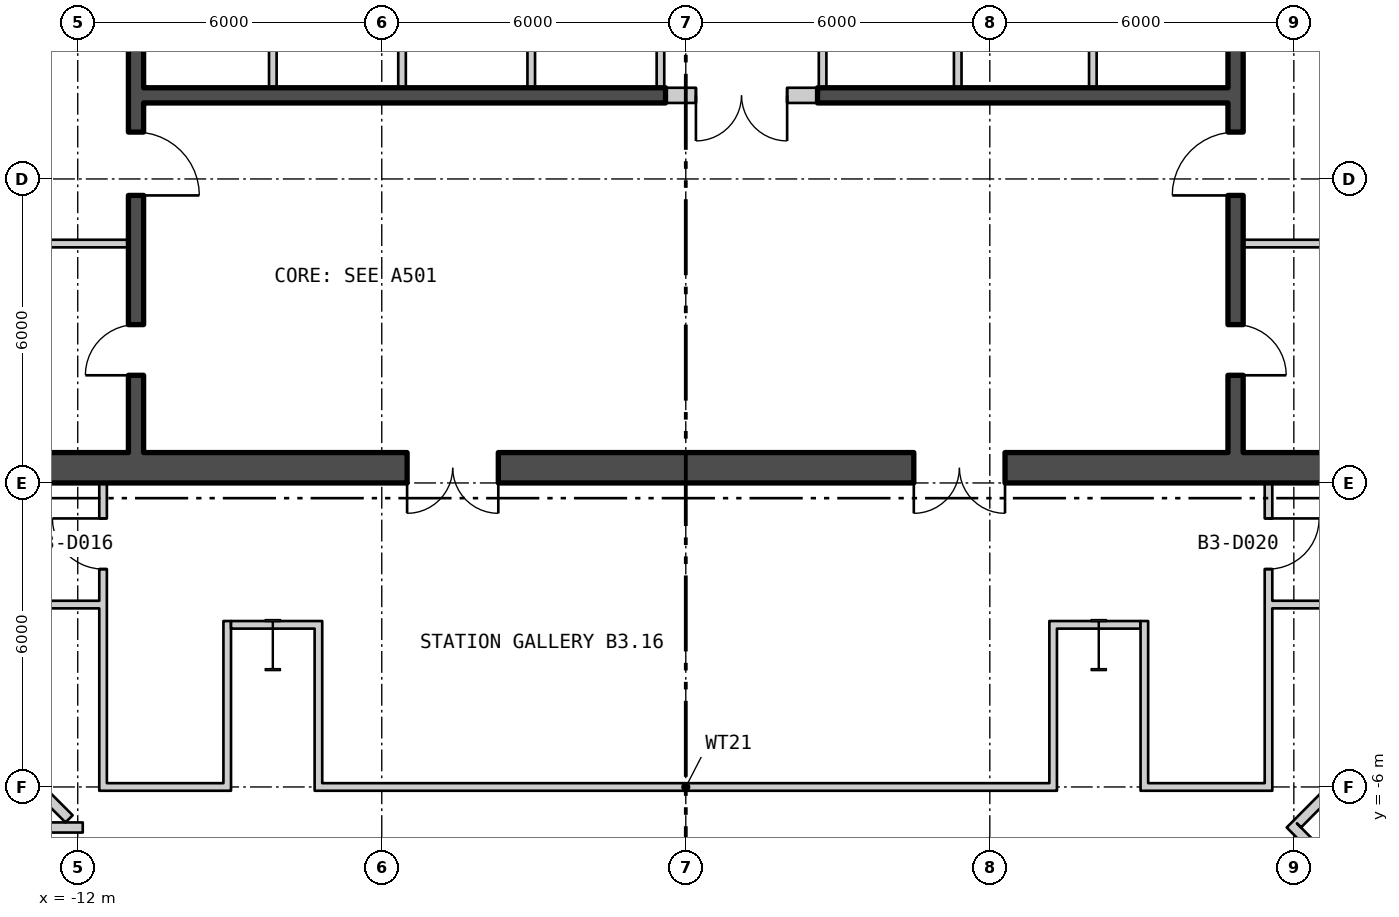
"""IFC4 building model, lengths in metres.
Left out: names, types, materials, properties, quantities, classifications, styles, units other than length and angle.
Written with IfcOpenShell. Run it as: python <this file> out.ifc"""

import sys

from ifc_helpers import new_model, si_unit, direction, frame, frame_2d, origin, origin_2d, place, context, subcontext, project, spatial, rectangle, i_section, extrude, element, fill, save


model = new_model("IFC4")
c1 = context("Model", 3, precision=1e-05, world=origin(), true_north=direction((0.0, 1.0)))
c2 = subcontext(c1, "Body", "Model", "MODEL_VIEW")
j1 = project(units=[si_unit("LENGTHUNIT", "METRE"), si_unit("PLANEANGLEUNIT", "RADIAN")], contexts=[c1])
p1 = place(None, origin())
s1 = spatial("IfcSite", under=j1, at=p1, CompositionType="ELEMENT")
p2 = place(p1, origin())
s2 = spatial("IfcBuilding", under=s1, at=p2, CompositionType="ELEMENT")
p3 = place(p2, frame((0.0, 0.0, -16.8)))
s3 = spatial("IfcBuildingStorey", under=s2, at=p3, CompositionType="ELEMENT", Elevation=-16.8)
for number, where, z_axis, x_axis in (
    (1, (8.15, -3.2, 0.0), (0.0, 0.0, 1.0), (1.0, 0.0, 0.0)),
    (2, (-8.15, -3.2, 0.0), (0.0, 0.0, 1.0), (1.0, 0.0, 0.0)),
):
    element("IfcColumn", number, at=place(p3, frame(where, z_axis=z_axis, x_axis=x_axis)), inside=s3, PredefinedType="COLUMN", context=c2, shape_type="SweptSolid", body=[
        extrude(i_section(OverallWidth=0.302, OverallDepth=1.008, WebThickness=0.021, FlangeThickness=0.04, at=origin_2d()), origin(), (0.0, 0.0, 1.0), 5.4),
    ])
p4 = place(p3, frame((-17.5, 0.3, 0.0), z_axis=(0.0, 0.0, 1.0), x_axis=(1.0, 0.0, 0.0)))
e3 = element("IfcWall", 3, at=p4, inside=s3, PredefinedType="SHEAR", context=c2, shape_type="SweptSolid", body=[
    extrude(rectangle(XDim=35.0, YDim=0.6, at=frame_2d((17.5, 0.0))), origin(), (0.0, 0.0, 1.0), 4.95),
])
p5 = place(p4, frame((12.0, 0.0, 0.0)))
e4 = element("IfcOpeningElement", 4, at=p5, cuts=e3, PredefinedType="OPENING", context=c2, shape_type="SweptSolid", body=[
    extrude(rectangle(XDim=1.8, YDim=2.4, at=frame_2d((0.9, 1.2))), frame((0.0, 0.31, 0.0), z_axis=(0.0, -1.0, 0.0), x_axis=(1.0, 0.0, 0.0)), (0.0, 0.0, 1.0), 0.62),
])
p6 = place(p4, frame((22.0, 0.0, 0.0)))
e5 = element("IfcOpeningElement", 5, at=p6, cuts=e3, PredefinedType="OPENING", context=c2, shape_type="SweptSolid", body=[
    extrude(rectangle(XDim=1.8, YDim=2.4, at=frame_2d((0.9, 1.2))), frame((0.0, 0.31, 0.0), z_axis=(0.0, -1.0, 0.0), x_axis=(1.0, 0.0, 0.0)), (0.0, 0.0, 1.0), 0.62),
])
p7 = place(p3, frame((-10.85, 0.6, 0.0), z_axis=(0.0, 0.0, 1.0), x_axis=(0.0, 1.0, 0.0)))
e6 = element("IfcWall", 6, at=p7, inside=s3, PredefinedType="SHEAR", context=c2, shape_type="SweptSolid", body=[
    extrude(rectangle(XDim=16.8, YDim=0.3, at=frame_2d((8.4, 0.0))), origin(), (0.0, 0.0, 1.0), 4.95),
])
p8 = place(p7, frame((5.075, 0.0, 0.0)))
e7 = element("IfcOpeningElement", 7, at=p8, cuts=e6, PredefinedType="OPENING", context=c2, shape_type="SweptSolid", body=[
    extrude(rectangle(XDim=1.25, YDim=2.1, at=frame_2d((0.625, 1.05))), frame((0.0, 0.16, 0.0), z_axis=(0.0, -1.0, 0.0), x_axis=(1.0, 0.0, 0.0)), (0.0, 0.0, 1.0), 0.32),
])
p9 = place(p7, frame((1.525, 0.0, 0.0)))
e8 = element("IfcOpeningElement", 8, at=p9, cuts=e6, PredefinedType="OPENING", context=c2, shape_type="SweptSolid", body=[
    extrude(rectangle(XDim=1.0, YDim=2.1, at=frame_2d((0.5, 1.05))), frame((0.0, 0.16, 0.0), z_axis=(0.0, -1.0, 0.0), x_axis=(1.0, 0.0, 0.0)), (0.0, 0.0, 1.0), 0.32),
])
p10 = place(p3, frame((10.85, 0.6, 0.0), z_axis=(0.0, 0.0, 1.0), x_axis=(0.0, 1.0, 0.0)))
e9 = element("IfcWall", 9, at=p10, inside=s3, PredefinedType="SHEAR", context=c2, shape_type="SweptSolid", body=[
    extrude(rectangle(XDim=16.8, YDim=0.3, at=frame_2d((8.4, 0.0))), origin(), (0.0, 0.0, 1.0), 4.95),
])
p11 = place(p10, frame((5.075, 0.0, 0.0)))
e10 = element("IfcOpeningElement", 10, at=p11, cuts=e9, PredefinedType="OPENING", context=c2, shape_type="SweptSolid", body=[
    extrude(rectangle(XDim=1.25, YDim=2.1, at=frame_2d((0.625, 1.05))), frame((0.0, 0.16, 0.0), z_axis=(0.0, -1.0, 0.0), x_axis=(1.0, 0.0, 0.0)), (0.0, 0.0, 1.0), 0.32),
])
p12 = place(p10, frame((1.525, 0.0, 0.0)))
e11 = element("IfcOpeningElement", 11, at=p12, cuts=e9, PredefinedType="OPENING", context=c2, shape_type="SweptSolid", body=[
    extrude(rectangle(XDim=1.0, YDim=2.1, at=frame_2d((0.5, 1.05))), frame((0.0, 0.16, 0.0), z_axis=(0.0, -1.0, 0.0), x_axis=(1.0, 0.0, 0.0)), (0.0, 0.0, 1.0), 0.32),
])
p13 = place(p3, frame((-10.7, 7.65, 0.0), z_axis=(0.0, 0.0, 1.0), x_axis=(1.0, 0.0, 0.0)))
e12 = element("IfcWall", 12, at=p13, inside=s3, PredefinedType="SHEAR", context=c2, shape_type="SweptSolid", body=[
    extrude(rectangle(XDim=10.3, YDim=0.3, at=frame_2d((5.15, 0.0))), origin(), (0.0, 0.0, 1.0), 4.95),
])
p14 = place(p3, frame((2.6, 7.65, 0.0), z_axis=(0.0, 0.0, 1.0), x_axis=(1.0, 0.0, 0.0)))
e13 = element("IfcWall", 13, at=p14, inside=s3, PredefinedType="SHEAR", context=c2, shape_type="SweptSolid", body=[
    extrude(rectangle(XDim=8.1, YDim=0.3, at=frame_2d((4.05, 0.0))), origin(), (0.0, 0.0, 1.0), 4.95),
])
for number, where, z_axis, x_axis in (
    (14, (-8.15, 7.8, 0.0), (0.0, 0.0, 1.0), (0.0, 1.0, 0.0)),
    (15, (-5.6, 7.8, 0.0), (0.0, 0.0, 1.0), (0.0, 1.0, 0.0)),
    (16, (-3.05, 7.8, 0.0), (0.0, 0.0, 1.0), (0.0, 1.0, 0.0)),
    (17, (-0.5, 7.8, 0.0), (0.0, 0.0, 1.0), (0.0, 1.0, 0.0)),
    (18, (2.7, 7.8, 0.0), (0.0, 0.0, 1.0), (0.0, 1.0, 0.0)),
    (19, (5.367, 7.8, 0.0), (0.0, 0.0, 1.0), (0.0, 1.0, 0.0)),
    (20, (8.033, 7.8, 0.0), (0.0, 0.0, 1.0), (0.0, 1.0, 0.0)),
):
    element("IfcWall", number, at=place(p3, frame(where, z_axis=z_axis, x_axis=x_axis)), inside=s3, PredefinedType="PARTITIONING", context=c2, shape_type="SweptSolid", body=[
        extrude(rectangle(XDim=2.7, YDim=0.15, at=frame_2d((1.35, 0.0))), origin(), (0.0, 0.0, 1.0), 4.95),
    ])
for number, where, z_axis, x_axis in (
    (21, (-14.2, 4.725, 0.0), (0.0, 0.0, 1.0), (1.0, 0.0, 0.0)),
    (22, (11.0, 4.725, 0.0), (0.0, 0.0, 1.0), (1.0, 0.0, 0.0)),
):
    element("IfcWall", number, at=place(p3, frame(where, z_axis=z_axis, x_axis=x_axis)), inside=s3, PredefinedType="PARTITIONING", context=c2, shape_type="SweptSolid", body=[
        extrude(rectangle(XDim=3.2, YDim=0.15, at=frame_2d((1.6, 0.0))), origin(), (0.0, 0.0, 1.0), 4.95),
    ])
p15 = place(p3, frame((-0.4, 7.65, 0.0), z_axis=(0.0, 0.0, 1.0), x_axis=(1.0, 0.0, 0.0)))
e23 = element("IfcWall", 23, at=p15, inside=s3, PredefinedType="PARTITIONING", context=c2, shape_type="SweptSolid", body=[
    extrude(rectangle(XDim=3.0, YDim=0.3, at=frame_2d((1.5, 0.0))), origin(), (0.0, 0.0, 1.0), 4.95),
])
p16 = place(p15, frame((0.6, 0.0, 0.0)))
e24 = element("IfcOpeningElement", 24, at=p16, cuts=e23, PredefinedType="OPENING", context=c2, shape_type="SweptSolid", body=[
    extrude(rectangle(XDim=1.8, YDim=2.4, at=frame_2d((0.9, 1.2))), frame((0.0, 0.16, 0.0), z_axis=(0.0, -1.0, 0.0), x_axis=(1.0, 0.0, 0.0)), (0.0, 0.0, 1.0), 0.32),
])
p17 = place(p3, frame((-17.2, -6.799, 0.0), z_axis=(0.0, 0.0, 1.0), x_axis=(0.999999982193, -0.000188714848, 0.0)))
e25 = element("IfcWall", 25, at=p17, inside=s3, PredefinedType="PARTITIONING", context=c2, shape_type="SweptSolid", body=[
    extrude(rectangle(XDim=5.299, YDim=0.2, at=frame_2d((2.65, 0.0))), origin(), (0.0, 0.0, 1.0), 4.95),
])
p18 = place(p3, frame((-12.721, -2.4, 0.0), z_axis=(0.0, 0.0, 1.0), x_axis=(1.0, 0.0, 0.0)))
e26 = element("IfcWall", 26, at=p18, inside=s3, PredefinedType="PARTITIONING", context=c2, shape_type="SweptSolid", body=[
    extrude(rectangle(XDim=1.146, YDim=0.15, at=frame_2d((0.573, 0.0))), origin(), (0.0, 0.0, 1.0), 4.95),
])
p19 = place(p3, frame((-12.633, -6.167, 0.0), z_axis=(0.0, 0.0, 1.0), x_axis=(0.707106781187, -0.707106781187, 0.0)))
e27 = element("IfcWall", 27, at=p19, inside=s3, PredefinedType="PARTITIONING", context=c2, shape_type="SweptSolid", body=[
    extrude(rectangle(XDim=0.653, YDim=0.2, at=frame_2d((0.327, 0.0))), origin(), (0.0, 0.0, 1.0), 4.95),
])
p20 = place(p3, frame((-11.5, -6.075, 0.0), z_axis=(0.0, 0.0, 1.0), x_axis=(0.0, 1.0, 0.0)))
e28 = element("IfcWall", 28, at=p20, inside=s3, PredefinedType="PARTITIONING", context=c2, shape_type="SweptSolid", body=[
    extrude(rectangle(XDim=6.075, YDim=0.15, at=frame_2d((3.038, 0.0))), origin(), (0.0, 0.0, 1.0), 4.95),
])
p21 = place(p20, frame((4.375, 0.0, 0.0)))
e29 = element("IfcOpeningElement", 29, at=p21, cuts=e28, PredefinedType="OPENING", context=c2, shape_type="SweptSolid", body=[
    extrude(rectangle(XDim=1.0, YDim=2.1, at=frame_2d((0.5, 1.05))), frame((0.0, 0.085, 0.0), z_axis=(0.0, -1.0, 0.0), x_axis=(1.0, 0.0, 0.0)), (0.0, 0.0, 1.0), 0.17),
])
p22 = place(p3, frame((-11.425, -6.0, 0.0), z_axis=(0.0, 0.0, 1.0), x_axis=(1.0, 0.0, 0.0)))
e30 = element("IfcWall", 30, at=p22, inside=s3, PredefinedType="PARTITIONING", context=c2, shape_type="SweptSolid", body=[
    extrude(rectangle(XDim=2.3, YDim=0.15, at=frame_2d((1.15, 0.0))), origin(), (0.0, 0.0, 1.0), 4.95),
])
p23 = place(p3, frame((-9.05, -6.075, 0.0), z_axis=(0.0, 0.0, 1.0), x_axis=(0.0, 1.0, 0.0)))
e31 = element("IfcWall", 31, at=p23, inside=s3, PredefinedType="PARTITIONING", context=c2, shape_type="SweptSolid", body=[
    extrude(rectangle(XDim=3.35, YDim=0.15, at=frame_2d((1.675, 0.0))), origin(), (0.0, 0.0, 1.0), 4.95),
])
p24 = place(p3, frame((-8.975, -2.8, 0.0), z_axis=(0.0, 0.0, 1.0), x_axis=(1.0, 0.0, 0.0)))
e32 = element("IfcWall", 32, at=p24, inside=s3, PredefinedType="PARTITIONING", context=c2, shape_type="SweptSolid", body=[
    extrude(rectangle(XDim=1.65, YDim=0.15, at=frame_2d((0.825, 0.0))), origin(), (0.0, 0.0, 1.0), 4.95),
])
p25 = place(p3, frame((-7.325, -6.0, 0.0), z_axis=(0.0, 0.0, 1.0), x_axis=(1.0, 0.0, 0.0)))
e33 = element("IfcWall", 33, at=p25, inside=s3, PredefinedType="PARTITIONING", context=c2, shape_type="SweptSolid", body=[
    extrude(rectangle(XDim=14.65, YDim=0.15, at=frame_2d((7.325, 0.0))), origin(), (0.0, 0.0, 1.0), 4.95),
])
for number, where, z_axis, x_axis in (
    (34, (-7.25, -5.925, 0.0), (0.0, 0.0, 1.0), (0.0, 1.0, 0.0)),
    (35, (7.25, -5.925, 0.0), (0.0, 0.0, 1.0), (0.0, 1.0, 0.0)),
):
    element("IfcWall", number, at=place(p3, frame(where, z_axis=z_axis, x_axis=x_axis)), inside=s3, PredefinedType="PARTITIONING", context=c2, shape_type="SweptSolid", body=[
        extrude(rectangle(XDim=3.2, YDim=0.15, at=frame_2d((1.6, 0.0))), origin(), (0.0, 0.0, 1.0), 4.95),
    ])
p26 = place(p3, frame((7.325, -2.8, 0.0), z_axis=(0.0, 0.0, 1.0), x_axis=(1.0, 0.0, 0.0)))
e36 = element("IfcWall", 36, at=p26, inside=s3, PredefinedType="PARTITIONING", context=c2, shape_type="SweptSolid", body=[
    extrude(rectangle(XDim=1.65, YDim=0.15, at=frame_2d((0.825, 0.0))), origin(), (0.0, 0.0, 1.0), 4.95),
])
p27 = place(p3, frame((9.05, -6.075, 0.0), z_axis=(0.0, 0.0, 1.0), x_axis=(0.0, 1.0, 0.0)))
e37 = element("IfcWall", 37, at=p27, inside=s3, PredefinedType="PARTITIONING", context=c2, shape_type="SweptSolid", body=[
    extrude(rectangle(XDim=3.35, YDim=0.15, at=frame_2d((1.675, 0.0))), origin(), (0.0, 0.0, 1.0), 4.95),
])
p28 = place(p3, frame((9.125, -6.0, 0.0), z_axis=(0.0, 0.0, 1.0), x_axis=(1.0, 0.0, 0.0)))
e38 = element("IfcWall", 38, at=p28, inside=s3, PredefinedType="PARTITIONING", context=c2, shape_type="SweptSolid", body=[
    extrude(rectangle(XDim=2.3, YDim=0.15, at=frame_2d((1.15, 0.0))), origin(), (0.0, 0.0, 1.0), 4.95),
])
p29 = place(p3, frame((11.5, -6.075, 0.0), z_axis=(0.0, 0.0, 1.0), x_axis=(0.0, 1.0, 0.0)))
e39 = element("IfcWall", 39, at=p29, inside=s3, PredefinedType="PARTITIONING", context=c2, shape_type="SweptSolid", body=[
    extrude(rectangle(XDim=6.075, YDim=0.15, at=frame_2d((3.038, 0.0))), origin(), (0.0, 0.0, 1.0), 4.95),
])
p30 = place(p29, frame((4.375, 0.0, 0.0)))
e40 = element("IfcOpeningElement", 40, at=p30, cuts=e39, PredefinedType="OPENING", context=c2, shape_type="SweptSolid", body=[
    extrude(rectangle(XDim=1.0, YDim=2.1, at=frame_2d((0.5, 1.05))), frame((0.0, 0.085, 0.0), z_axis=(0.0, -1.0, 0.0), x_axis=(1.0, 0.0, 0.0)), (0.0, 0.0, 1.0), 0.17),
])
p31 = place(p3, frame((11.575, -2.4, 0.0), z_axis=(0.0, 0.0, 1.0), x_axis=(1.0, 0.0, 0.0)))
e41 = element("IfcWall", 41, at=p31, inside=s3, PredefinedType="PARTITIONING", context=c2, shape_type="SweptSolid", body=[
    extrude(rectangle(XDim=1.147, YDim=0.15, at=frame_2d((0.574, 0.0))), origin(), (0.0, 0.0, 1.0), 4.95),
])
p32 = place(p3, frame((11.93, -6.729, 0.0), z_axis=(0.0, 0.0, 1.0), x_axis=(0.704095721434, -0.710105073252, 0.0)))
e42 = element("IfcWall", 42, at=p32, inside=s3, PredefinedType="PARTITIONING", context=c2, shape_type="SweptSolid", body=[
    extrude(rectangle(XDim=0.998, YDim=0.2, at=frame_2d((0.499, 0.0))), origin(), (0.0, 0.0, 1.0), 4.95),
])
p33 = place(p3, frame((12.071, -6.729, 0.0), z_axis=(0.0, 0.0, 1.0), x_axis=(0.703968315265, 0.710231378568, 0.0)))
e43 = element("IfcWall", 43, at=p33, inside=s3, PredefinedType="PARTITIONING", context=c2, shape_type="SweptSolid", body=[
    extrude(rectangle(XDim=0.798, YDim=0.2, at=frame_2d((0.399, 0.0))), origin(), (0.0, 0.0, 1.0), 4.95),
])
p34 = place(p8, origin())
e44 = element("IfcDoor", 44, at=p34, inside=s3, OperationType="SINGLE_SWING_LEFT", PredefinedType="DOOR", context=c2, shape_type="SweptSolid", body=[
    extrude(rectangle(XDim=1.25, YDim=2.1, at=frame_2d((0.625, 1.05))), frame((0.0, 0.025, 0.0), z_axis=(0.0, -1.0, 0.0), x_axis=(1.0, 0.0, 0.0)), (0.0, 0.0, 1.0), 0.05),
])
fill(e7, e44)
p35 = place(p9, origin())
e45 = element("IfcDoor", 45, at=p35, inside=s3, OperationType="SINGLE_SWING_RIGHT", PredefinedType="DOOR", context=c2, shape_type="SweptSolid", body=[
    extrude(rectangle(XDim=1.0, YDim=2.1, at=frame_2d((0.5, 1.05))), frame((0.0, 0.025, 0.0), z_axis=(0.0, -1.0, 0.0), x_axis=(1.0, 0.0, 0.0)), (0.0, 0.0, 1.0), 0.05),
])
fill(e8, e45)
p36 = place(p11, origin())
e46 = element("IfcDoor", 46, at=p36, inside=s3, OperationType="SINGLE_SWING_RIGHT", PredefinedType="DOOR", context=c2, shape_type="SweptSolid", body=[
    extrude(rectangle(XDim=1.25, YDim=2.1, at=frame_2d((0.625, 1.05))), frame((0.0, 0.025, 0.0), z_axis=(0.0, -1.0, 0.0), x_axis=(1.0, 0.0, 0.0)), (0.0, 0.0, 1.0), 0.05),
])
fill(e10, e46)
p37 = place(p12, origin())
e47 = element("IfcDoor", 47, at=p37, inside=s3, OperationType="SINGLE_SWING_LEFT", PredefinedType="DOOR", context=c2, shape_type="SweptSolid", body=[
    extrude(rectangle(XDim=1.0, YDim=2.1, at=frame_2d((0.5, 1.05))), frame((0.0, 0.025, 0.0), z_axis=(0.0, -1.0, 0.0), x_axis=(1.0, 0.0, 0.0)), (0.0, 0.0, 1.0), 0.05),
])
fill(e11, e47)
p38 = place(p16, origin())
e48 = element("IfcDoor", 48, at=p38, inside=s3, OperationType="DOUBLE_DOOR_SINGLE_SWING", PredefinedType="DOOR", context=c2, shape_type="SweptSolid", body=[
    extrude(rectangle(XDim=1.8, YDim=2.4, at=frame_2d((0.9, 1.2))), frame((0.0, 0.025, 0.0), z_axis=(0.0, -1.0, 0.0), x_axis=(1.0, 0.0, 0.0)), (0.0, 0.0, 1.0), 0.05),
])
fill(e24, e48)
p39 = place(p5, origin())
e49 = element("IfcDoor", 49, at=p39, inside=s3, OperationType="DOUBLE_DOOR_SINGLE_SWING", PredefinedType="DOOR", context=c2, shape_type="SweptSolid", body=[
    extrude(rectangle(XDim=1.8, YDim=2.4, at=frame_2d((0.9, 1.2))), frame((0.0, 0.025, 0.0), z_axis=(0.0, -1.0, 0.0), x_axis=(1.0, 0.0, 0.0)), (0.0, 0.0, 1.0), 0.05),
])
fill(e4, e49)
p40 = place(p6, origin())
e50 = element("IfcDoor", 50, at=p40, inside=s3, OperationType="DOUBLE_DOOR_SINGLE_SWING", PredefinedType="DOOR", context=c2, shape_type="SweptSolid", body=[
    extrude(rectangle(XDim=1.8, YDim=2.4, at=frame_2d((0.9, 1.2))), frame((0.0, 0.025, 0.0), z_axis=(0.0, -1.0, 0.0), x_axis=(1.0, 0.0, 0.0)), (0.0, 0.0, 1.0), 0.05),
])
fill(e5, e50)
p41 = place(p21, origin())
e51 = element("IfcDoor", 51, at=p41, inside=s3, OperationType="SINGLE_SWING_LEFT", PredefinedType="DOOR", context=c2, shape_type="SweptSolid", body=[
    extrude(rectangle(XDim=1.0, YDim=2.1, at=frame_2d((0.5, 1.05))), frame((0.0, 0.025, 0.0), z_axis=(0.0, -1.0, 0.0), x_axis=(1.0, 0.0, 0.0)), (0.0, 0.0, 1.0), 0.05),
])
fill(e29, e51)
p42 = place(p30, origin())
e52 = element("IfcDoor", 52, at=p42, inside=s3, OperationType="SINGLE_SWING_RIGHT", PredefinedType="DOOR", context=c2, shape_type="SweptSolid", body=[
    extrude(rectangle(XDim=1.0, YDim=2.1, at=frame_2d((0.5, 1.05))), frame((0.0, 0.025, 0.0), z_axis=(0.0, -1.0, 0.0), x_axis=(1.0, 0.0, 0.0)), (0.0, 0.0, 1.0), 0.05),
])
fill(e40, e52)
save(model, sys.argv[1])
